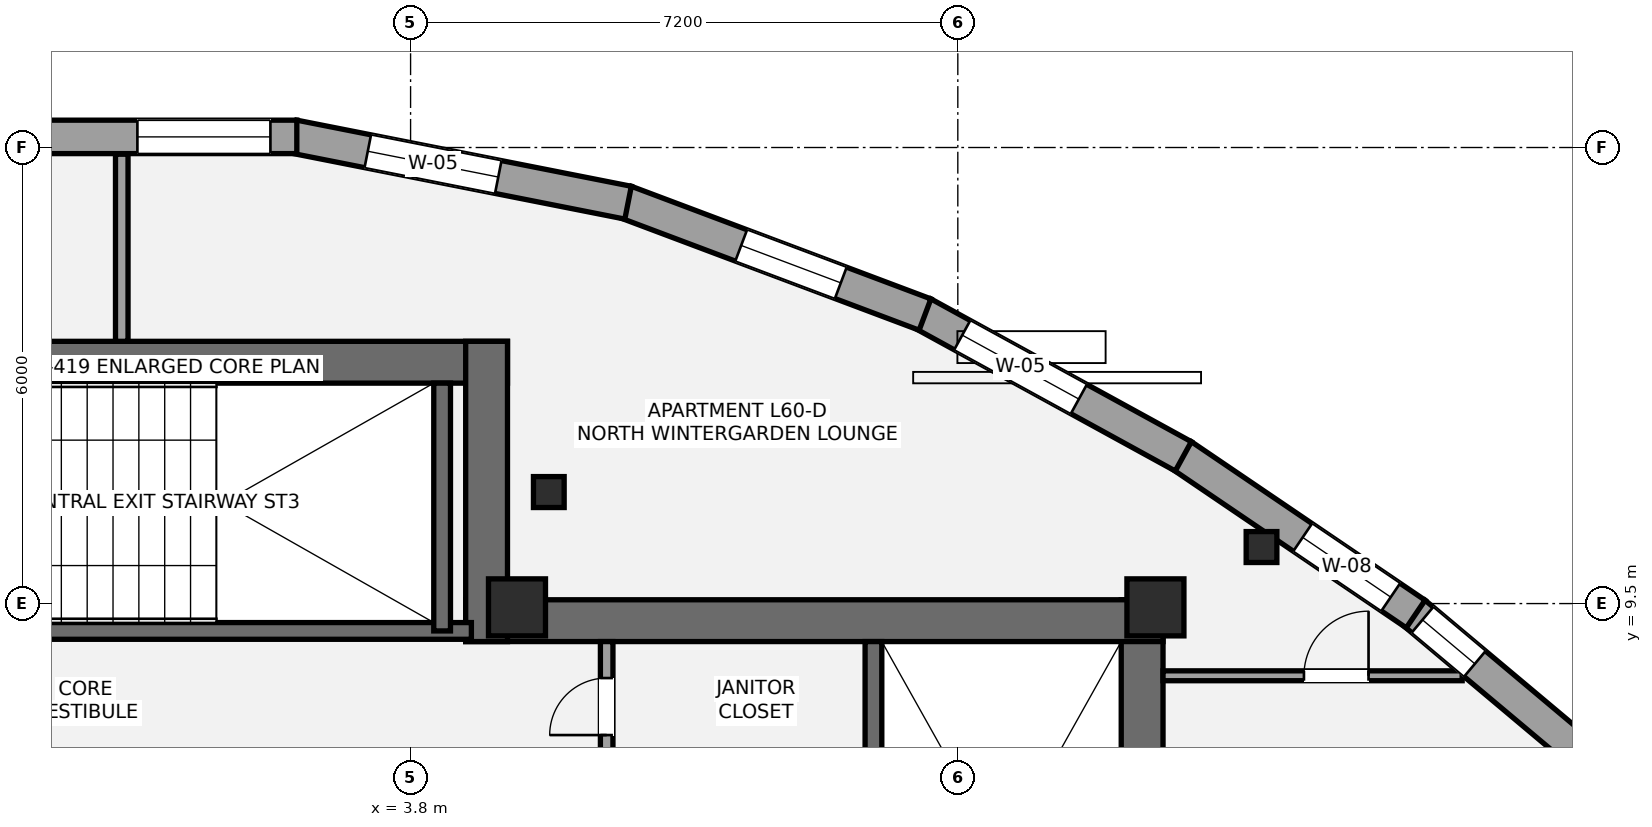
"""IFC4 building model, lengths in metres.
Left out: names, types, materials, properties, quantities, classifications, styles, units other than length and angle.
Written with IfcOpenShell. Run it as: python <this file> out.ifc"""

import sys

from ifc_helpers import new_model, si_unit, direction, frame, frame_2d, origin, origin_2d, place, context, subcontext, project, spatial, rectangle, i_section, extrude, element, fill, save


model = new_model("IFC4")
c1 = context("Model", 3, precision=1e-05, world=origin(), true_north=direction((0.0, 1.0)))
c2 = subcontext(c1, "Body", "Model", "MODEL_VIEW")
j1 = project(units=[si_unit("LENGTHUNIT", "METRE"), si_unit("PLANEANGLEUNIT", "RADIAN")], contexts=[c1])
p1 = place(None, origin())
s1 = spatial("IfcSite", under=j1, at=p1, CompositionType="ELEMENT")
p2 = place(p1, origin())
s2 = spatial("IfcBuilding", under=s1, at=p2, CompositionType="ELEMENT")
p3 = place(p2, frame((0.0, 0.0, 216.3)))
s3 = spatial("IfcBuildingStorey", under=s2, at=p3, CompositionType="ELEMENT", Elevation=216.3)
p4 = place(p3, frame((13.425, 1.3, 0.0), z_axis=(0.0, 0.0, 1.0), x_axis=(0.0, 1.0, 0.0)))
e1 = element("IfcWall", 1, at=p4, inside=s3, PredefinedType="SHEAR", context=c2, shape_type="SweptSolid", body=[
    extrude(rectangle(XDim=8.25, YDim=0.55, at=frame_2d((4.125, 0.0))), origin(), (0.0, 0.0, 1.0), 3.15),
])
p5 = place(p3, frame((4.525, 9.275, 0.0), z_axis=(0.0, 0.0, 1.0), x_axis=(1.0, 0.0, 0.0)))
e2 = element("IfcWall", 2, at=p5, inside=s3, PredefinedType="SHEAR", context=c2, shape_type="SweptSolid", body=[
    extrude(rectangle(XDim=9.175, YDim=0.55, at=frame_2d((4.587, 0.0))), origin(), (0.0, 0.0, 1.0), 3.15),
])
p6 = place(p3, frame((9.89, 1.85, 0.0), z_axis=(0.0, 0.0, 1.0), x_axis=(0.0, 1.0, 0.0)))
e3 = element("IfcWall", 3, at=p6, inside=s3, PredefinedType="SHEAR", context=c2, shape_type="SweptSolid", body=[
    extrude(rectangle(XDim=7.15, YDim=0.22, at=frame_2d((3.575, 0.0))), origin(), (0.0, 0.0, 1.0), 3.15),
])
p7 = place(p3, frame((-5.075, 12.675, 0.0), z_axis=(0.0, 0.0, 1.0), x_axis=(1.0, 0.0, 0.0)))
e4 = element("IfcWall", 4, at=p7, inside=s3, PredefinedType="SHEAR", context=c2, shape_type="SweptSolid", body=[
    extrude(rectangle(XDim=10.15, YDim=0.55, at=frame_2d((5.075, 0.0))), origin(), (0.0, 0.0, 1.0), 3.15),
])
p8 = place(p3, frame((4.8, 9.0, 0.0), z_axis=(0.0, 0.0, 1.0), x_axis=(0.0, 1.0, 0.0)))
e5 = element("IfcWall", 5, at=p8, inside=s3, PredefinedType="SHEAR", context=c2, shape_type="SweptSolid", body=[
    extrude(rectangle(XDim=3.95, YDim=0.55, at=frame_2d((1.975, 0.0))), origin(), (0.0, 0.0, 1.0), 3.15),
])
p9 = place(p3, frame((-4.7, 9.14, 0.0), z_axis=(0.0, 0.0, 1.0), x_axis=(1.0, 0.0, 0.0)))
e6 = element("IfcWall", 6, at=p9, inside=s3, PredefinedType="SHEAR", context=c2, shape_type="SweptSolid", body=[
    extrude(rectangle(XDim=9.3, YDim=0.22, at=frame_2d((4.65, 0.0))), origin(), (0.0, 0.0, 1.0), 3.15),
])
p10 = place(p9, frame((1.15, 0.0, 0.0)))
e7 = element("IfcOpeningElement", 7, at=p10, cuts=e6, PredefinedType="OPENING", context=c2, shape_type="SweptSolid", body=[
    extrude(rectangle(XDim=1.05, YDim=2.15, at=frame_2d((0.525, 1.075))), frame((0.0, 0.12, 0.0), z_axis=(0.0, -1.0, 0.0), x_axis=(1.0, 0.0, 0.0)), (0.0, 0.0, 1.0), 0.24),
])
p11 = place(p3, frame((4.215, 9.14, 0.0), z_axis=(0.0, 0.0, 1.0), x_axis=(0.0, 1.0, 0.0)))
e8 = element("IfcWall", 8, at=p11, inside=s3, PredefinedType="SHEAR", context=c2, shape_type="SweptSolid", body=[
    extrude(rectangle(XDim=3.26, YDim=0.22, at=frame_2d((1.63, 0.0))), origin(), (0.0, 0.0, 1.0), 3.15),
])
for number, where, z_axis, x_axis in (
    (9, (5.2, 9.45, 0.0), (0.0, 0.0, 1.0), (1.0, 0.0, 0.0)),
    (10, (13.6, 9.45, 0.0), (0.0, 0.0, 1.0), (1.0, 0.0, 0.0)),
):
    element("IfcColumn", number, at=place(p3, frame(where, z_axis=z_axis, x_axis=x_axis)), inside=s3, PredefinedType="PILASTER", context=c2, shape_type="SweptSolid", body=[
        extrude(rectangle(XDim=0.75, YDim=0.75, at=origin_2d()), origin(), (0.0, 0.0, 1.0), 3.15),
    ])
for number, where, z_axis, x_axis in (
    (11, (14.996, 10.244, 0.0), (0.0, 0.0, 1.0), (1.0, 0.0, 0.0)),
    (12, (5.619, 10.967, 0.0), (0.0, 0.0, 1.0), (1.0, 0.0, 0.0)),
):
    element("IfcColumn", number, at=place(p3, frame(where, z_axis=z_axis, x_axis=x_axis)), inside=s3, PredefinedType="COLUMN", context=c2, shape_type="SweptSolid", body=[
        extrude(i_section(OverallWidth=0.404, OverallDepth=0.407, WebThickness=0.027, FlangeThickness=0.044, at=origin_2d()), origin(), (0.0, 0.0, 1.0), 3.15),
    ])
p12 = place(p3, frame((17.006, 9.376, 0.0), z_axis=(0.0, 0.0, 1.0), x_axis=(0.766063904081, -0.642764416302, 0.0)))
e13 = element("IfcWall", 13, at=p12, inside=s3, PredefinedType="STANDARD", context=c2, shape_type="SweptSolid", body=[
    extrude(rectangle(XDim=3.615, YDim=0.44, at=frame_2d((1.808, 0.0))), origin(), (0.0, 0.0, 1.0), 2.336),
])
p13 = place(p12, frame((0.14, 0.0, 0.58)))
e14 = element("IfcOpeningElement", 14, at=p13, cuts=e13, PredefinedType="OPENING", context=c2, shape_type="SweptSolid", body=[
    extrude(rectangle(XDim=0.9, YDim=1.35, at=frame_2d((0.45, 0.675))), frame((0.0, 0.23, 0.0), z_axis=(0.0, -1.0, 0.0), x_axis=(1.0, 0.0, 0.0)), (0.0, 0.0, 1.0), 0.46),
])
p14 = place(p3, frame((13.949, 11.448, 0.0), z_axis=(0.0, 0.0, 1.0), x_axis=(0.827595704154, -0.561324639105, 0.0)))
e15 = element("IfcWall", 15, at=p14, inside=s3, PredefinedType="STANDARD", context=c2, shape_type="SweptSolid", body=[
    extrude(rectangle(XDim=3.715, YDim=0.44, at=frame_2d((1.858, 0.0))), origin(), (0.0, 0.0, 1.0), 2.336),
])
p15 = place(p14, frame((1.919, 0.0, 0.58)))
e16 = element("IfcOpeningElement", 16, at=p15, cuts=e15, PredefinedType="OPENING", context=c2, shape_type="SweptSolid", body=[
    extrude(rectangle(XDim=1.4, YDim=1.55, at=frame_2d((0.7, 0.775))), frame((0.0, 0.23, 0.0), z_axis=(0.0, -1.0, 0.0), x_axis=(1.0, 0.0, 0.0)), (0.0, 0.0, 1.0), 0.46),
])
p16 = place(p3, frame((10.54, 13.315, 0.0), z_axis=(0.0, 0.0, 1.0), x_axis=(0.87688122565, -0.480707100117, 0.0)))
e17 = element("IfcWall", 17, at=p16, inside=s3, PredefinedType="STANDARD", context=c2, shape_type="SweptSolid", body=[
    extrude(rectangle(XDim=3.908, YDim=0.44, at=frame_2d((1.954, 0.0))), origin(), (0.0, 0.0, 1.0), 2.336),
])
p17 = place(p16, frame((0.591, 0.0, 0.55)))
e18 = element("IfcOpeningElement", 18, at=p17, cuts=e17, PredefinedType="OPENING", context=c2, shape_type="SweptSolid", body=[
    extrude(rectangle(XDim=1.75, YDim=1.55, at=frame_2d((0.875, 0.775))), frame((0.0, 0.23, 0.0), z_axis=(0.0, -1.0, 0.0), x_axis=(1.0, 0.0, 0.0)), (0.0, 0.0, 1.0), 0.46),
])
p18 = place(p3, frame((6.627, 14.784, 0.0), z_axis=(0.0, 0.0, 1.0), x_axis=(0.936069207768, -0.351815915314, 0.0)))
e19 = element("IfcWall", 19, at=p18, inside=s3, PredefinedType="STANDARD", context=c2, shape_type="SweptSolid", body=[
    extrude(rectangle(XDim=4.211, YDim=0.44, at=frame_2d((2.105, 0.0))), origin(), (0.0, 0.0, 1.0), 2.336),
])
p19 = place(p18, frame((1.627, 0.0, 0.55)))
e20 = element("IfcOpeningElement", 20, at=p19, cuts=e19, PredefinedType="OPENING", context=c2, shape_type="SweptSolid", body=[
    extrude(rectangle(XDim=1.4, YDim=1.55, at=frame_2d((0.7, 0.775))), frame((0.0, 0.23, 0.0), z_axis=(0.0, -1.0, 0.0), x_axis=(1.0, 0.0, 0.0)), (0.0, 0.0, 1.0), 0.46),
])
p20 = place(p3, frame((2.26, 15.644, 0.0), z_axis=(0.0, 0.0, 1.0), x_axis=(0.981032244947, -0.193844613996, 0.0)))
e21 = element("IfcWall", 21, at=p20, inside=s3, PredefinedType="STANDARD", context=c2, shape_type="SweptSolid", body=[
    extrude(rectangle(XDim=4.486, YDim=0.44, at=frame_2d((2.243, 0.0))), origin(), (0.0, 0.0, 1.0), 2.336),
])
p21 = place(p20, frame((0.995, 0.0, 0.55)))
e22 = element("IfcOpeningElement", 22, at=p21, cuts=e21, PredefinedType="OPENING", context=c2, shape_type="SweptSolid", body=[
    extrude(rectangle(XDim=1.75, YDim=1.55, at=frame_2d((0.875, 0.775))), frame((0.0, 0.23, 0.0), z_axis=(0.0, -1.0, 0.0), x_axis=(1.0, 0.0, 0.0)), (0.0, 0.0, 1.0), 0.46),
])
p22 = place(p3, frame((-2.303, 15.64, 0.0), z_axis=(0.0, 0.0, 1.0), x_axis=(1.0, 0.0, 0.0)))
e23 = element("IfcWall", 23, at=p22, inside=s3, PredefinedType="STANDARD", context=c2, shape_type="SweptSolid", body=[
    extrude(rectangle(XDim=4.606, YDim=0.44, at=frame_2d((2.303, 0.0))), origin(), (0.0, 0.0, 1.0), 2.336),
])
p23 = place(p22, frame((2.509, 0.0, 0.55)))
e24 = element("IfcOpeningElement", 24, at=p23, cuts=e23, PredefinedType="OPENING", context=c2, shape_type="SweptSolid", body=[
    extrude(rectangle(XDim=1.75, YDim=1.55, at=frame_2d((0.875, 0.775))), frame((0.0, 0.23, 0.0), z_axis=(0.0, -1.0, 0.0), x_axis=(1.0, 0.0, 0.0)), (0.0, 0.0, 1.0), 0.46),
])
p24 = place(p3, frame((6.38, 7.42, 0.0), z_axis=(0.0, 0.0, 1.0), x_axis=(0.0, 1.0, 0.0)))
e25 = element("IfcWall", 25, at=p24, inside=s3, PredefinedType="PARTITIONING", context=c2, shape_type="SweptSolid", body=[
    extrude(rectangle(XDim=1.58, YDim=0.165, at=frame_2d((0.79, 0.0))), origin(), (0.0, 0.0, 1.0), 2.97),
])
p25 = place(p24, frame((0.35, 0.0, 0.0)))
e26 = element("IfcOpeningElement", 26, at=p25, cuts=e25, PredefinedType="OPENING", context=c2, shape_type="SweptSolid", body=[
    extrude(rectangle(XDim=0.75, YDim=2.1, at=frame_2d((0.375, 1.05))), frame((0.0, 0.093, 0.0), z_axis=(0.0, -1.0, 0.0), x_axis=(1.0, 0.0, 0.0)), (0.0, 0.0, 1.0), 0.185),
])
p26 = place(p3, frame((0.0, 12.95, 0.0), z_axis=(0.0, 0.0, 1.0), x_axis=(0.0, 1.0, 0.0)))
e27 = element("IfcWall", 27, at=p26, inside=s3, PredefinedType="PARTITIONING", context=c2, shape_type="SweptSolid", body=[
    extrude(rectangle(XDim=2.462, YDim=0.165, at=frame_2d((1.231, 0.0))), origin(), (0.0, 0.0, 1.0), 2.97),
])
p27 = place(p3, frame((13.7, 8.55, 0.0), z_axis=(0.0, 0.0, 1.0), x_axis=(1.0, 0.0, 0.0)))
e28 = element("IfcWall", 28, at=p27, inside=s3, PredefinedType="PARTITIONING", context=c2, shape_type="SweptSolid", body=[
    extrude(rectangle(XDim=3.936, YDim=0.13, at=frame_2d((1.968, 0.0))), origin(), (0.0, 0.0, 1.0), 2.423),
])
p28 = place(p27, frame((1.854, 0.0, 0.0)))
e29 = element("IfcOpeningElement", 29, at=p28, cuts=e28, PredefinedType="OPENING", context=c2, shape_type="SweptSolid", body=[
    extrude(rectangle(XDim=0.85, YDim=2.1, at=frame_2d((0.425, 1.05))), frame((0.0, 0.075, 0.0), z_axis=(0.0, -1.0, 0.0), x_axis=(1.0, 0.0, 0.0)), (0.0, 0.0, 1.0), 0.15),
])
p29 = place(p15, origin())
e30 = element("IfcWindow", 30, at=p29, inside=s3, PartitioningType="SINGLE_PANEL", PredefinedType="WINDOW", context=c2, shape_type="SweptSolid", body=[
    extrude(rectangle(XDim=1.4, YDim=1.55, at=frame_2d((0.7, 0.775))), frame((0.0, -0.01, 0.0), z_axis=(0.0, -1.0, 0.0), x_axis=(1.0, 0.0, 0.0)), (0.0, 0.0, 1.0), 0.06),
])
fill(e16, e30)
p30 = place(p17, origin())
e31 = element("IfcWindow", 31, at=p30, inside=s3, PartitioningType="SINGLE_PANEL", PredefinedType="WINDOW", context=c2, shape_type="SweptSolid", body=[
    extrude(rectangle(XDim=1.75, YDim=1.55, at=frame_2d((0.875, 0.775))), frame((0.0, -0.01, 0.0), z_axis=(0.0, -1.0, 0.0), x_axis=(1.0, 0.0, 0.0)), (0.0, 0.0, 1.0), 0.06),
])
fill(e18, e31)
p31 = place(p19, origin())
e32 = element("IfcWindow", 32, at=p31, inside=s3, PartitioningType="SINGLE_PANEL", PredefinedType="WINDOW", context=c2, shape_type="SweptSolid", body=[
    extrude(rectangle(XDim=1.4, YDim=1.55, at=frame_2d((0.7, 0.775))), frame((0.0, -0.01, 0.0), z_axis=(0.0, -1.0, 0.0), x_axis=(1.0, 0.0, 0.0)), (0.0, 0.0, 1.0), 0.06),
])
fill(e20, e32)
p32 = place(p21, origin())
e33 = element("IfcWindow", 33, at=p32, inside=s3, PartitioningType="SINGLE_PANEL", PredefinedType="WINDOW", context=c2, shape_type="SweptSolid", body=[
    extrude(rectangle(XDim=1.75, YDim=1.55, at=frame_2d((0.875, 0.775))), frame((0.0, -0.01, 0.0), z_axis=(0.0, -1.0, 0.0), x_axis=(1.0, 0.0, 0.0)), (0.0, 0.0, 1.0), 0.06),
])
fill(e22, e33)
p33 = place(p23, origin())
e34 = element("IfcWindow", 34, at=p33, inside=s3, PartitioningType="SINGLE_PANEL", PredefinedType="WINDOW", context=c2, shape_type="SweptSolid", body=[
    extrude(rectangle(XDim=1.75, YDim=1.55, at=frame_2d((0.875, 0.775))), frame((0.0, -0.01, 0.0), z_axis=(0.0, -1.0, 0.0), x_axis=(1.0, 0.0, 0.0)), (0.0, 0.0, 1.0), 0.06),
])
fill(e24, e34)
p34 = place(p13, origin())
e35 = element("IfcWindow", 35, at=p34, inside=s3, PartitioningType="SINGLE_PANEL", PredefinedType="WINDOW", context=c2, shape_type="SweptSolid", body=[
    extrude(rectangle(XDim=0.9, YDim=1.35, at=frame_2d((0.45, 0.675))), frame((0.0, -0.01, 0.0), z_axis=(0.0, -1.0, 0.0), x_axis=(1.0, 0.0, 0.0)), (0.0, 0.0, 1.0), 0.06),
])
fill(e14, e35)
p35 = place(p25, origin())
e36 = element("IfcDoor", 36, at=p35, inside=s3, OperationType="SINGLE_SWING_LEFT", PredefinedType="DOOR", context=c2, shape_type="SweptSolid", body=[
    extrude(rectangle(XDim=0.75, YDim=2.1, at=frame_2d((0.375, 1.05))), frame((0.0, 0.025, 0.0), z_axis=(0.0, -1.0, 0.0), x_axis=(1.0, 0.0, 0.0)), (0.0, 0.0, 1.0), 0.05),
])
fill(e26, e36)
p36 = place(p28, origin())
e37 = element("IfcDoor", 37, at=p36, inside=s3, OperationType="SINGLE_SWING_RIGHT", PredefinedType="DOOR", context=c2, shape_type="SweptSolid", body=[
    extrude(rectangle(XDim=0.85, YDim=2.1, at=frame_2d((0.425, 1.05))), frame((0.0, 0.025, 0.0), z_axis=(0.0, -1.0, 0.0), x_axis=(1.0, 0.0, 0.0)), (0.0, 0.0, 1.0), 0.05),
])
fill(e29, e37)
save(model, sys.argv[1])
